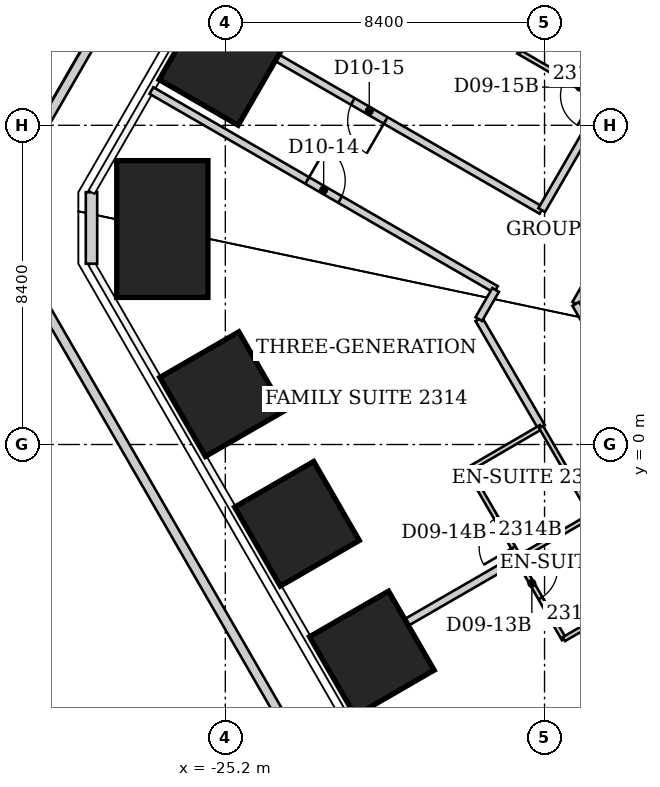
"""IFC4 building model, lengths in metres.
Left out: names, types, materials, properties, quantities, classifications, styles, units other than length and angle.
Written with IfcOpenShell. Run it as: python <this file> out.ifc"""

import sys

from ifc_helpers import new_model, si_unit, direction, frame, frame_2d, origin, origin_2d, place, context, subcontext, project, spatial, rectangle, extrude, clip, halfspace, element, fill, save


model = new_model("IFC4")
c1 = context("Model", 3, precision=1e-05, world=origin(), true_north=direction((0.0, 1.0)))
c2 = subcontext(c1, "Body", "Model", "MODEL_VIEW")
j1 = project(units=[si_unit("LENGTHUNIT", "METRE"), si_unit("PLANEANGLEUNIT", "RADIAN")], contexts=[c1])
p1 = place(None, origin())
s1 = spatial("IfcSite", under=j1, at=p1, CompositionType="ELEMENT")
p2 = place(p1, origin())
s2 = spatial("IfcBuilding", under=s1, at=p2, CompositionType="ELEMENT")
p3 = place(p2, frame((0.0, 0.0, 96.8)))
s3 = spatial("IfcBuildingStorey", under=s2, at=p3, CompositionType="ELEMENT", Elevation=96.8)
p4 = place(p3, frame((-21.344, -5.499, -0.056), z_axis=(0.0, 0.0, 1.0), x_axis=(-0.866025403784, -0.5, 0.0)))
e1 = element("IfcColumn", 1, at=p4, inside=s3, PredefinedType="COLUMN", context=c2, shape_type="SweptSolid", body=[
    clip(extrude(rectangle(XDim=2.4, YDim=2.4, at=origin_2d()), origin(), (0.0, 0.0, 1.0), 3.856), halfspace(frame((0.0, 0.0, 0.056)), True)),
])
p5 = place(p3, frame((-23.314, -2.087, -0.064), z_axis=(0.0, 0.0, 1.0), x_axis=(-0.866025403784, -0.5, 0.0)))
e2 = element("IfcColumn", 2, at=p5, inside=s3, PredefinedType="COLUMN", context=c2, shape_type="SweptSolid", body=[
    clip(extrude(rectangle(XDim=2.4, YDim=2.4, at=origin_2d()), origin(), (0.0, 0.0, 1.0), 3.865), halfspace(frame((0.0, 0.0, 0.064)), True)),
])
p6 = place(p3, frame((-25.284, 1.325, -0.073), z_axis=(0.0, 0.0, 1.0), x_axis=(-0.866025403784, -0.5, 0.0)))
e3 = element("IfcColumn", 3, at=p6, inside=s3, PredefinedType="COLUMN", context=c2, shape_type="SweptSolid", body=[
    clip(extrude(rectangle(XDim=2.4, YDim=2.4, at=origin_2d()), origin(), (0.0, 0.0, 1.0), 3.873), halfspace(frame((0.0, 0.0, 0.073)), True)),
])
p7 = place(p3, frame((-26.857, 5.67, -0.074), z_axis=(0.0, 0.0, 1.0), x_axis=(-1.0, 0.0, 0.0)))
e4 = element("IfcColumn", 4, at=p7, inside=s3, PredefinedType="COLUMN", context=c2, shape_type="SweptSolid", body=[
    clip(extrude(rectangle(XDim=2.4, YDim=3.6, at=origin_2d()), origin(), (0.0, 0.0, 1.0), 3.874), halfspace(frame((0.0, 0.0, 0.074)), True)),
])
p8 = place(p3, frame((-25.302, 10.041, -0.063), z_axis=(0.0, 0.0, 1.0), x_axis=(-0.866025403784, 0.5, 0.0)))
e5 = element("IfcColumn", 5, at=p8, inside=s3, PredefinedType="COLUMN", context=c2, shape_type="SweptSolid", body=[
    clip(extrude(rectangle(XDim=2.4, YDim=2.4, at=origin_2d()), origin(), (0.0, 0.0, 1.0), 3.863), halfspace(frame((0.0, 0.0, 0.063)), True)),
])
p9 = place(p3, frame((-28.721, 4.759, 0.0), z_axis=(0.0, 0.0, 1.0), x_axis=(0.0, 1.0, 0.0)))
e6 = element("IfcWall", 6, at=p9, inside=s3, PredefinedType="SOLIDWALL", context=c2, shape_type="SweptSolid", body=[
    extrude(rectangle(XDim=1.88, YDim=0.3, at=frame_2d((0.94, 0.0))), origin(), (0.0, 0.0, 1.0), 3.64),
])
p10 = place(p3, frame((-21.475, 23.139, 0.0), z_axis=(0.0, 0.0, 1.0), x_axis=(-0.499999656836, -0.86602560191, 0.0)))
e7 = element("IfcWall", 7, at=p10, inside=s3, PredefinedType="PARAPET", context=c2, shape_type="SweptSolid", body=[
    extrude(rectangle(XDim=18.602, YDim=0.25, at=frame_2d((9.301, 0.0))), origin(), (0.0, 0.0, 1.0), 1.1),
])
p11 = place(p3, frame((-30.775, 5.038, 0.0), z_axis=(0.0, 0.0, 1.0), x_axis=(0.499999235055, -0.866025845425, 0.0)))
e8 = element("IfcWall", 8, at=p11, inside=s3, PredefinedType="PARAPET", context=c2, shape_type="SweptSolid", body=[
    extrude(rectangle(XDim=39.5, YDim=0.25, at=frame_2d((19.75, 0.0))), origin(), (0.0, 0.0, 1.0), 1.1),
])
p12 = place(p3, frame((-27.144, 9.315, 0.0), z_axis=(0.0, 0.0, 1.0), x_axis=(0.865951726818, -0.500127590541, 0.0)))
e9 = element("IfcWall", 9, at=p12, inside=s3, PredefinedType="PARTITIONING", context=c2, shape_type="SweptSolid", body=[
    extrude(rectangle(XDim=10.467, YDim=0.2, at=frame_2d((5.233, 0.0))), origin(), (0.0, 0.0, 1.0), 3.64),
])
p13 = place(p12, frame((4.734, 0.0, 0.0)))
e10 = element("IfcOpeningElement", 10, at=p13, cuts=e9, PredefinedType="OPENING", context=c2, shape_type="SweptSolid", body=[
    extrude(rectangle(XDim=1.0, YDim=2.13, at=frame_2d((0.5, 1.065))), frame((0.0, 0.1, 0.0), z_axis=(0.0, -1.0, 0.0), x_axis=(1.0, 0.0, 0.0)), (0.0, 0.0, 1.0), 0.2),
])
p14 = place(p3, frame((-18.81, -0.66, 0.0), z_axis=(0.0, 0.0, 1.0), x_axis=(0.501789229896, -0.86498992408, 0.0)))
e11 = element("IfcWall", 11, at=p14, inside=s3, PredefinedType="PARTITIONING", context=c2, shape_type="SweptSolid", body=[
    extrude(rectangle(XDim=2.671, YDim=0.12, at=frame_2d((1.335, 0.0))), origin(), (0.0, 0.0, 1.0), 3.64),
])
p15 = place(p14, frame((1.47, 0.0, 0.0)))
e12 = element("IfcOpeningElement", 12, at=p15, cuts=e11, PredefinedType="OPENING", context=c2, shape_type="SweptSolid", body=[
    extrude(rectangle(XDim=0.9, YDim=2.03, at=frame_2d((0.45, 1.015))), frame((0.0, 0.06, 0.0), z_axis=(0.0, -1.0, 0.0), x_axis=(1.0, 0.0, 0.0)), (0.0, 0.0, 1.0), 0.12),
])
p16 = place(p3, frame((-18.53, 3.3, 0.0), z_axis=(0.0, 0.0, 1.0), x_axis=(0.502321995867, -0.864680641895, 0.0)))
e13 = element("IfcWall", 13, at=p16, inside=s3, PredefinedType="PARTITIONING", context=c2, shape_type="SweptSolid", body=[
    extrude(rectangle(XDim=3.285, YDim=0.2, at=frame_2d((1.642, 0.0))), origin(), (0.0, 0.0, 1.0), 3.64),
])
p17 = place(p3, frame((-18.087, 4.067, 0.0), z_axis=(0.0, 0.0, 1.0), x_axis=(-0.499905448813, -0.866079986056, 0.0)))
e14 = element("IfcWall", 14, at=p17, inside=s3, PredefinedType="PARTITIONING", context=c2, shape_type="SweptSolid", body=[
    extrude(rectangle(XDim=0.885, YDim=0.2, at=frame_2d((0.443, 0.0))), origin(), (0.0, 0.0, 1.0), 3.64),
])
p18 = place(p3, frame((-17.51, -3.0, 0.0), z_axis=(0.0, 0.0, 1.0), x_axis=(0.864434275542, 0.502745843611, 0.0)))
e15 = element("IfcWall", 15, at=p18, inside=s3, PredefinedType="PARTITIONING", context=c2, shape_type="SweptSolid", body=[
    extrude(rectangle(XDim=2.267, YDim=0.12, at=frame_2d((1.134, 0.0))), origin(), (0.0, 0.0, 1.0), 3.64),
])
p19 = place(p3, frame((-17.508, -3.004, 0.0), z_axis=(0.0, 0.0, 1.0), x_axis=(0.498775507858, -0.866731211369, 0.0)))
e16 = element("IfcWall", 16, at=p19, inside=s3, PredefinedType="PARTITIONING", context=c2, shape_type="SweptSolid", body=[
    extrude(rectangle(XDim=2.441, YDim=0.12, at=frame_2d((1.22, 0.0))), origin(), (0.0, 0.0, 1.0), 3.64),
])
p20 = place(p19, frame((0.3, 0.0, 0.0)))
e17 = element("IfcOpeningElement", 17, at=p20, cuts=e16, PredefinedType="OPENING", context=c2, shape_type="SweptSolid", body=[
    extrude(rectangle(XDim=0.9, YDim=2.03, at=frame_2d((0.45, 1.015))), frame((0.0, 0.06, 0.0), z_axis=(0.0, -1.0, 0.0), x_axis=(1.0, 0.0, 0.0)), (0.0, 0.0, 1.0), 0.12),
])
p21 = place(p3, frame((-17.49, 10.34, 0.0), z_axis=(0.0, 0.0, 1.0), x_axis=(0.866114241029, -0.499846097802, 0.0)))
e18 = element("IfcWall", 18, at=p21, inside=s3, PredefinedType="PARTITIONING", context=c2, shape_type="SweptSolid", body=[
    extrude(rectangle(XDim=2.621, YDim=0.12, at=frame_2d((1.311, 0.0))), origin(), (0.0, 0.0, 1.0), 3.64),
])
p22 = place(p21, frame((1.421, 0.0, 0.0)))
e19 = element("IfcOpeningElement", 19, at=p22, cuts=e18, PredefinedType="OPENING", context=c2, shape_type="SweptSolid", body=[
    extrude(rectangle(XDim=0.9, YDim=2.03, at=frame_2d((0.45, 1.015))), frame((0.0, 0.06, 0.0), z_axis=(0.0, -1.0, 0.0), x_axis=(1.0, 0.0, 0.0)), (0.0, 0.0, 1.0), 0.12),
])
p23 = place(p3, frame((-17.47, -2.97, 0.0), z_axis=(0.0, 0.0, 1.0), x_axis=(-0.865919350456, -0.50018364478, 0.0)))
e20 = element("IfcWall", 20, at=p23, inside=s3, PredefinedType="PARTITIONING", context=c2, shape_type="SweptSolid", body=[
    extrude(rectangle(XDim=5.758, YDim=0.2, at=frame_2d((2.879, 0.0))), origin(), (0.0, 0.0, 1.0), 3.64),
])
p24 = place(p3, frame((-16.89, 0.46, 0.0), z_axis=(0.0, 0.0, 1.0), x_axis=(-0.863822716314, -0.503795905878, 0.0)))
e21 = element("IfcWall", 21, at=p24, inside=s3, PredefinedType="PARTITIONING", context=c2, shape_type="SweptSolid", body=[
    extrude(rectangle(XDim=2.223, YDim=0.12, at=frame_2d((1.111, 0.0))), origin(), (0.0, 0.0, 1.0), 3.64),
])
p25 = place(p3, frame((-16.88, 6.16, 0.0), z_axis=(0.0, 0.0, 1.0), x_axis=(-0.86594745947, 0.500134979218, 0.0)))
e22 = element("IfcWall", 22, at=p25, inside=s3, PredefinedType="PARTITIONING", context=c2, shape_type="SweptSolid", body=[
    extrude(rectangle(XDim=10.467, YDim=0.2, at=frame_2d((5.234, 0.0))), origin(), (0.0, 0.0, 1.0), 3.64),
])
p26 = place(p25, frame((4.734, 0.0, 0.0)))
e23 = element("IfcOpeningElement", 23, at=p26, cuts=e22, PredefinedType="OPENING", context=c2, shape_type="SweptSolid", body=[
    extrude(rectangle(XDim=1.0, YDim=2.13, at=frame_2d((0.5, 1.065))), frame((0.0, 0.1, 0.0), z_axis=(0.0, -1.0, 0.0), x_axis=(1.0, 0.0, 0.0)), (0.0, 0.0, 1.0), 0.2),
])
p27 = place(p3, frame((-16.875, 6.169, 0.0), z_axis=(0.0, 0.0, 1.0), x_axis=(0.500689767595, 0.865626799854, 0.0)))
e24 = element("IfcWall", 24, at=p27, inside=s3, PredefinedType="PARTITIONING", context=c2, shape_type="SweptSolid", body=[
    extrude(rectangle(XDim=3.305, YDim=0.2, at=frame_2d((1.653, 0.0))), origin(), (0.0, 0.0, 1.0), 3.64),
])
p28 = place(p3, frame((-16.29, -5.12, 0.0), z_axis=(0.0, 0.0, 1.0), x_axis=(0.865497265561, 0.500913648553, 0.0)))
e25 = element("IfcWall", 25, at=p28, inside=s3, PredefinedType="PARTITIONING", context=c2, shape_type="SweptSolid", body=[
    extrude(rectangle(XDim=2.276, YDim=0.12, at=frame_2d((1.138, 0.0))), origin(), (0.0, 0.0, 1.0), 3.64),
])
p29 = place(p3, frame((-16.29, 12.41, 0.0), z_axis=(0.0, 0.0, 1.0), x_axis=(-0.501547039172, -0.865130376012, 0.0)))
e26 = element("IfcWall", 26, at=p29, inside=s3, PredefinedType="PARTITIONING", context=c2, shape_type="SweptSolid", body=[
    extrude(rectangle(XDim=2.393, YDim=0.12, at=frame_2d((1.196, 0.0))), origin(), (0.0, 0.0, 1.0), 3.64),
])
p30 = place(p3, frame((-15.98, 3.7, 0.0), z_axis=(0.0, 0.0, 1.0), x_axis=(0.500093981358, 0.865971136822, 0.0)))
e27 = element("IfcWall", 27, at=p30, inside=s3, PredefinedType="PARTITIONING", context=c2, shape_type="SweptSolid", body=[
    extrude(rectangle(XDim=8.418, YDim=0.2, at=frame_2d((4.209, 0.0))), origin(), (0.0, 0.0, 1.0), 3.64),
])
p31 = place(p3, frame((-15.55, -1.86, 0.0), z_axis=(0.0, 0.0, 1.0), x_axis=(-0.500098439427, 0.865968562295, 0.0)))
e28 = element("IfcWall", 28, at=p31, inside=s3, PredefinedType="PARTITIONING", context=c2, shape_type="SweptSolid", body=[
    extrude(rectangle(XDim=2.679, YDim=0.12, at=frame_2d((1.34, 0.0))), origin(), (0.0, 0.0, 1.0), 3.64),
])
p32 = place(p3, frame((-11.42, -4.21, 0.0), z_axis=(0.0, 0.0, 1.0), x_axis=(-0.499446957289, 0.866344467781, 0.0)))
e29 = element("IfcWall", 29, at=p32, inside=s3, PredefinedType="PARTITIONING", context=c2, shape_type="SweptSolid", body=[
    extrude(rectangle(XDim=9.13, YDim=0.2, at=frame_2d((4.565, 0.0))), origin(), (0.0, 0.0, 1.0), 3.64),
])
p33 = place(p32, frame((4.015, 0.0, 0.0)))
e30 = element("IfcOpeningElement", 30, at=p33, cuts=e29, PredefinedType="OPENING", context=c2, shape_type="SweptSolid", body=[
    extrude(rectangle(XDim=1.1, YDim=2.2, at=frame_2d((0.55, 1.1))), frame((0.0, 0.1, 0.0), z_axis=(0.0, -1.0, 0.0), x_axis=(1.0, 0.0, 0.0)), (0.0, 0.0, 1.0), 0.2),
])
p34 = place(p20, origin())
e31 = element("IfcDoor", 31, at=p34, inside=s3, OperationType="SINGLE_SWING_LEFT", PredefinedType="DOOR", context=c2, shape_type="SweptSolid", body=[
    extrude(rectangle(XDim=0.9, YDim=2.03, at=frame_2d((0.45, 1.015))), frame((0.0, 0.025, 0.0), z_axis=(0.0, -1.0, 0.0), x_axis=(1.0, 0.0, 0.0)), (0.0, 0.0, 1.0), 0.05),
])
fill(e17, e31)
p35 = place(p13, origin())
e32 = element("IfcDoor", 32, at=p35, inside=s3, OperationType="SINGLE_SWING_LEFT", PredefinedType="DOOR", context=c2, shape_type="SweptSolid", body=[
    extrude(rectangle(XDim=1.0, YDim=2.13, at=frame_2d((0.5, 1.065))), frame((0.0, 0.025, 0.0), z_axis=(0.0, -1.0, 0.0), x_axis=(1.0, 0.0, 0.0)), (0.0, 0.0, 1.0), 0.05),
])
fill(e10, e32)
p36 = place(p15, origin())
e33 = element("IfcDoor", 33, at=p36, inside=s3, OperationType="SINGLE_SWING_RIGHT", PredefinedType="DOOR", context=c2, shape_type="SweptSolid", body=[
    extrude(rectangle(XDim=0.9, YDim=2.03, at=frame_2d((0.45, 1.015))), frame((0.0, 0.025, 0.0), z_axis=(0.0, -1.0, 0.0), x_axis=(1.0, 0.0, 0.0)), (0.0, 0.0, 1.0), 0.05),
])
fill(e12, e33)
p37 = place(p26, origin())
e34 = element("IfcDoor", 34, at=p37, inside=s3, OperationType="SINGLE_SWING_LEFT", PredefinedType="DOOR", context=c2, shape_type="SweptSolid", body=[
    extrude(rectangle(XDim=1.0, YDim=2.13, at=frame_2d((0.5, 1.065))), frame((0.0, 0.025, 0.0), z_axis=(0.0, -1.0, 0.0), x_axis=(1.0, 0.0, 0.0)), (0.0, 0.0, 1.0), 0.05),
])
fill(e23, e34)
p38 = place(p22, origin())
e35 = element("IfcDoor", 35, at=p38, inside=s3, OperationType="SINGLE_SWING_RIGHT", PredefinedType="DOOR", context=c2, shape_type="SweptSolid", body=[
    extrude(rectangle(XDim=0.9, YDim=2.03, at=frame_2d((0.45, 1.015))), frame((0.0, 0.025, 0.0), z_axis=(0.0, -1.0, 0.0), x_axis=(1.0, 0.0, 0.0)), (0.0, 0.0, 1.0), 0.05),
])
fill(e19, e35)
save(model, sys.argv[1])
